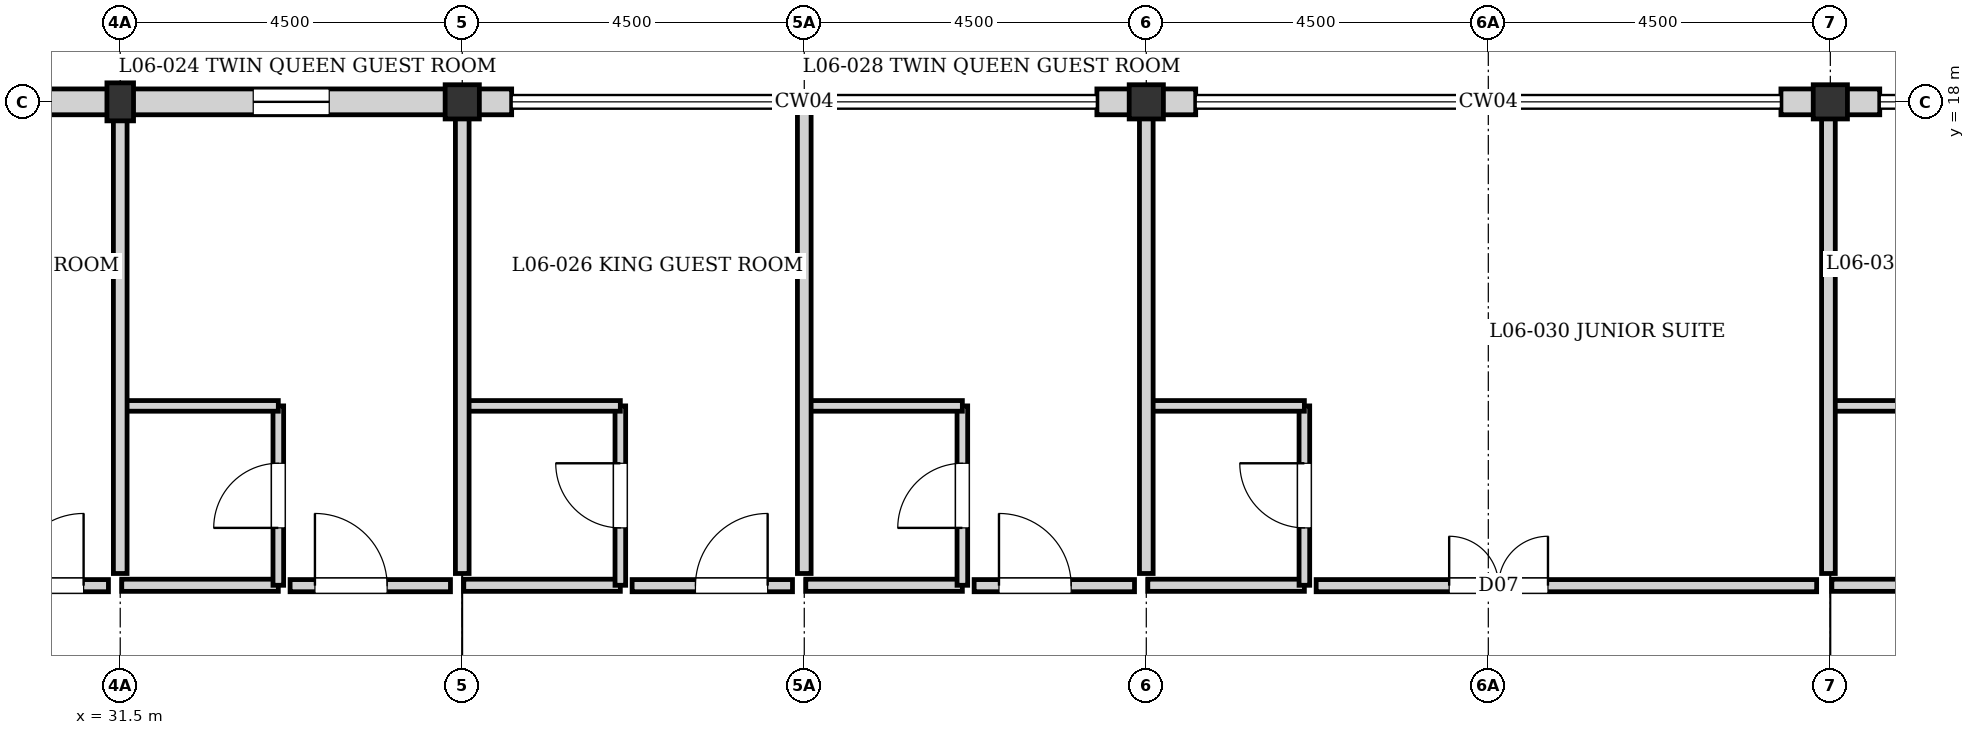
"""IFC4 building model, lengths in metres.
Left out: names, types, materials, properties, quantities, classifications, styles, units other than length and angle.
Written with IfcOpenShell. Run it as: python <this file> out.ifc"""

import sys

from ifc_helpers import new_model, si_unit, direction, frame, frame_2d, origin, origin_2d, place, context, subcontext, project, spatial, rectangle, extrude, element, fill, save


model = new_model("IFC4")
c1 = context("Model", 3, precision=1e-05, world=origin(), true_north=direction((0.0, 1.0)))
c2 = subcontext(c1, "Body", "Model", "MODEL_VIEW")
j1 = project(units=[si_unit("LENGTHUNIT", "METRE"), si_unit("PLANEANGLEUNIT", "RADIAN")], contexts=[c1])
p1 = place(None, origin())
s1 = spatial("IfcSite", under=j1, at=p1, CompositionType="ELEMENT")
p2 = place(p1, origin())
s2 = spatial("IfcBuilding", under=s1, at=p2, CompositionType="ELEMENT")
p3 = place(p2, frame((0.0, 0.0, 20.64)))
s3 = spatial("IfcBuildingStorey", under=s2, at=p3, CompositionType="ELEMENT", Elevation=20.64)
for number, where, z_axis, x_axis in (
    (1, (36.0, 18.0, 0.0), (0.0, 0.0, 1.0), (1.0, 0.0, 0.0)),
    (2, (45.0, 18.0, 0.0), (0.0, 0.0, 1.0), (1.0, 0.0, 0.0)),
    (3, (54.0, 18.0, 0.0), (0.0, 0.0, 1.0), (1.0, 0.0, 0.0)),
):
    element("IfcColumn", number, at=place(p3, frame(where, z_axis=z_axis, x_axis=x_axis)), inside=s3, PredefinedType="COLUMN", context=c2, shape_type="SweptSolid", body=[
        extrude(rectangle(XDim=0.45, YDim=0.45, at=origin_2d()), origin(), (0.0, 0.0, 1.0), 3.04),
    ])
p4 = place(p3, frame((31.5, 18.0, 0.0), z_axis=(0.0, 0.0, 1.0), x_axis=(1.0, 0.0, 0.0)))
e4 = element("IfcColumn", 4, at=p4, inside=s3, PredefinedType="PILASTER", context=c2, shape_type="SweptSolid", body=[
    extrude(rectangle(XDim=0.35, YDim=0.5, at=origin_2d()), origin(), (0.0, 0.0, 1.0), 3.04),
])
p5 = place(p3, frame((27.0, 18.0, 0.0), z_axis=(0.0, 0.0, 1.0), x_axis=(1.0, 0.0, 0.0)))
e5 = element("IfcWall", 5, at=p5, inside=s3, PredefinedType="SOLIDWALL", context=c2, shape_type="SweptSolid", body=[
    extrude(rectangle(XDim=9.0, YDim=0.34, at=frame_2d((4.5, 0.0))), origin(), (0.0, 0.0, 1.0), 2.38),
])
p6 = place(p5, frame((1.75, 0.0, 0.35)))
e6 = element("IfcOpeningElement", 6, at=p6, cuts=e5, PredefinedType="OPENING", context=c2, shape_type="SweptSolid", body=[
    extrude(rectangle(XDim=1.0, YDim=1.6, at=frame_2d((0.5, 0.8))), frame((0.0, 0.18, 0.0), z_axis=(0.0, -1.0, 0.0), x_axis=(1.0, 0.0, 0.0)), (0.0, 0.0, 1.0), 0.36),
])
p7 = place(p5, frame((6.25, 0.0, 0.35)))
e7 = element("IfcOpeningElement", 7, at=p7, cuts=e5, PredefinedType="OPENING", context=c2, shape_type="SweptSolid", body=[
    extrude(rectangle(XDim=1.0, YDim=1.6, at=frame_2d((0.5, 0.8))), frame((0.0, 0.18, 0.0), z_axis=(0.0, -1.0, 0.0), x_axis=(1.0, 0.0, 0.0)), (0.0, 0.0, 1.0), 0.36),
])
for number, where, z_axis, x_axis in (
    (8, (36.0, 18.0, 0.0), (0.0, 0.0, 1.0), (1.0, 0.0, 0.0)),
    (9, (44.35, 18.0, 0.0), (0.0, 0.0, 1.0), (1.0, 0.0, 0.0)),
):
    element("IfcWall", number, at=place(p3, frame(where, z_axis=z_axis, x_axis=x_axis)), inside=s3, PredefinedType="SOLIDWALL", context=c2, shape_type="SweptSolid", body=[
        extrude(rectangle(XDim=0.65, YDim=0.34, at=frame_2d((0.325, 0.0))), origin(), (0.0, 0.0, 1.0), 2.55),
    ])
for number, where, z_axis, x_axis in (
    (10, (45.0, 18.0, 0.0), (0.0, 0.0, 1.0), (1.0, 0.0, 0.0)),
    (11, (53.35, 18.0, 0.0), (0.0, 0.0, 1.0), (1.0, 0.0, 0.0)),
):
    element("IfcWall", number, at=place(p3, frame(where, z_axis=z_axis, x_axis=x_axis)), inside=s3, PredefinedType="SOLIDWALL", context=c2, shape_type="SweptSolid", body=[
        extrude(rectangle(XDim=0.65, YDim=0.34, at=frame_2d((0.325, 0.0))), origin(), (0.0, 0.0, 1.0), 2.48),
    ])
p8 = place(p3, frame((54.0, 18.0, 0.0), z_axis=(0.0, 0.0, 1.0), x_axis=(1.0, 0.0, 0.0)))
e12 = element("IfcWall", 12, at=p8, inside=s3, PredefinedType="SOLIDWALL", context=c2, shape_type="SweptSolid", body=[
    extrude(rectangle(XDim=0.65, YDim=0.34, at=frame_2d((0.325, 0.0))), origin(), (0.0, 0.0, 1.0), 2.42),
])
p9 = place(p3, frame((31.52, 11.64, 0.0), z_axis=(0.0, 0.0, 1.0), x_axis=(1.0, 0.0, 0.0)))
e13 = element("IfcWall", 13, at=p9, inside=s3, PredefinedType="PARTITIONING", context=c2, shape_type="SweptSolid", body=[
    extrude(rectangle(XDim=2.06, YDim=0.16, at=frame_2d((1.03, 0.0))), origin(), (0.0, 0.0, 1.0), 2.82),
])
p10 = place(p3, frame((33.58, 11.64, 0.0), z_axis=(0.0, 0.0, 1.0), x_axis=(0.0, 1.0, 0.0)))
e14 = element("IfcWall", 14, at=p10, inside=s3, PredefinedType="PLUMBINGWALL", context=c2, shape_type="SweptSolid", body=[
    extrude(rectangle(XDim=2.36, YDim=0.14, at=frame_2d((1.18, 0.0))), origin(), (0.0, 0.0, 1.0), 2.82),
])
p11 = place(p10, frame((0.755, 0.0, 0.0)))
e15 = element("IfcOpeningElement", 15, at=p11, cuts=e14, PredefinedType="OPENING", context=c2, shape_type="SweptSolid", body=[
    extrude(rectangle(XDim=0.85, YDim=2.04, at=frame_2d((0.425, 1.02))), frame((0.0, 0.08, 0.0), z_axis=(0.0, -1.0, 0.0), x_axis=(1.0, 0.0, 0.0)), (0.0, 0.0, 1.0), 0.16),
])
p12 = place(p3, frame((31.52, 14.0, 0.0), z_axis=(0.0, 0.0, 1.0), x_axis=(1.0, 0.0, 0.0)))
e16 = element("IfcWall", 16, at=p12, inside=s3, PredefinedType="PLUMBINGWALL", context=c2, shape_type="SweptSolid", body=[
    extrude(rectangle(XDim=2.06, YDim=0.14, at=frame_2d((1.03, 0.0))), origin(), (0.0, 0.0, 1.0), 2.82),
])
p13 = place(p3, frame((36.02, 11.64, 0.0), z_axis=(0.0, 0.0, 1.0), x_axis=(1.0, 0.0, 0.0)))
e17 = element("IfcWall", 17, at=p13, inside=s3, PredefinedType="PARTITIONING", context=c2, shape_type="SweptSolid", body=[
    extrude(rectangle(XDim=2.06, YDim=0.16, at=frame_2d((1.03, 0.0))), origin(), (0.0, 0.0, 1.0), 2.82),
])
p14 = place(p3, frame((38.08, 11.64, 0.0), z_axis=(0.0, 0.0, 1.0), x_axis=(0.0, 1.0, 0.0)))
e18 = element("IfcWall", 18, at=p14, inside=s3, PredefinedType="PLUMBINGWALL", context=c2, shape_type="SweptSolid", body=[
    extrude(rectangle(XDim=2.36, YDim=0.14, at=frame_2d((1.18, 0.0))), origin(), (0.0, 0.0, 1.0), 2.82),
])
p15 = place(p14, frame((0.755, 0.0, 0.0)))
e19 = element("IfcOpeningElement", 19, at=p15, cuts=e18, PredefinedType="OPENING", context=c2, shape_type="SweptSolid", body=[
    extrude(rectangle(XDim=0.85, YDim=2.04, at=frame_2d((0.425, 1.02))), frame((0.0, 0.08, 0.0), z_axis=(0.0, -1.0, 0.0), x_axis=(1.0, 0.0, 0.0)), (0.0, 0.0, 1.0), 0.16),
])
p16 = place(p3, frame((36.02, 14.0, 0.0), z_axis=(0.0, 0.0, 1.0), x_axis=(1.0, 0.0, 0.0)))
e20 = element("IfcWall", 20, at=p16, inside=s3, PredefinedType="PLUMBINGWALL", context=c2, shape_type="SweptSolid", body=[
    extrude(rectangle(XDim=2.06, YDim=0.14, at=frame_2d((1.03, 0.0))), origin(), (0.0, 0.0, 1.0), 2.82),
])
p17 = place(p3, frame((40.52, 11.64, 0.0), z_axis=(0.0, 0.0, 1.0), x_axis=(1.0, 0.0, 0.0)))
e21 = element("IfcWall", 21, at=p17, inside=s3, PredefinedType="PARTITIONING", context=c2, shape_type="SweptSolid", body=[
    extrude(rectangle(XDim=2.06, YDim=0.16, at=frame_2d((1.03, 0.0))), origin(), (0.0, 0.0, 1.0), 2.82),
])
p18 = place(p3, frame((42.58, 11.64, 0.0), z_axis=(0.0, 0.0, 1.0), x_axis=(0.0, 1.0, 0.0)))
e22 = element("IfcWall", 22, at=p18, inside=s3, PredefinedType="PLUMBINGWALL", context=c2, shape_type="SweptSolid", body=[
    extrude(rectangle(XDim=2.36, YDim=0.14, at=frame_2d((1.18, 0.0))), origin(), (0.0, 0.0, 1.0), 2.82),
])
p19 = place(p18, frame((0.755, 0.0, 0.0)))
e23 = element("IfcOpeningElement", 23, at=p19, cuts=e22, PredefinedType="OPENING", context=c2, shape_type="SweptSolid", body=[
    extrude(rectangle(XDim=0.85, YDim=2.04, at=frame_2d((0.425, 1.02))), frame((0.0, 0.08, 0.0), z_axis=(0.0, -1.0, 0.0), x_axis=(1.0, 0.0, 0.0)), (0.0, 0.0, 1.0), 0.16),
])
p20 = place(p3, frame((40.52, 14.0, 0.0), z_axis=(0.0, 0.0, 1.0), x_axis=(1.0, 0.0, 0.0)))
e24 = element("IfcWall", 24, at=p20, inside=s3, PredefinedType="PLUMBINGWALL", context=c2, shape_type="SweptSolid", body=[
    extrude(rectangle(XDim=2.06, YDim=0.14, at=frame_2d((1.03, 0.0))), origin(), (0.0, 0.0, 1.0), 2.82),
])
p21 = place(p3, frame((45.02, 11.64, 0.0), z_axis=(0.0, 0.0, 1.0), x_axis=(1.0, 0.0, 0.0)))
e25 = element("IfcWall", 25, at=p21, inside=s3, PredefinedType="PARTITIONING", context=c2, shape_type="SweptSolid", body=[
    extrude(rectangle(XDim=2.06, YDim=0.16, at=frame_2d((1.03, 0.0))), origin(), (0.0, 0.0, 1.0), 2.82),
])
p22 = place(p3, frame((47.08, 11.64, 0.0), z_axis=(0.0, 0.0, 1.0), x_axis=(0.0, 1.0, 0.0)))
e26 = element("IfcWall", 26, at=p22, inside=s3, PredefinedType="PLUMBINGWALL", context=c2, shape_type="SweptSolid", body=[
    extrude(rectangle(XDim=2.36, YDim=0.14, at=frame_2d((1.18, 0.0))), origin(), (0.0, 0.0, 1.0), 2.82),
])
p23 = place(p22, frame((0.755, 0.0, 0.0)))
e27 = element("IfcOpeningElement", 27, at=p23, cuts=e26, PredefinedType="OPENING", context=c2, shape_type="SweptSolid", body=[
    extrude(rectangle(XDim=0.85, YDim=2.04, at=frame_2d((0.425, 1.02))), frame((0.0, 0.08, 0.0), z_axis=(0.0, -1.0, 0.0), x_axis=(1.0, 0.0, 0.0)), (0.0, 0.0, 1.0), 0.16),
])
p24 = place(p3, frame((45.02, 14.0, 0.0), z_axis=(0.0, 0.0, 1.0), x_axis=(1.0, 0.0, 0.0)))
e28 = element("IfcWall", 28, at=p24, inside=s3, PredefinedType="PLUMBINGWALL", context=c2, shape_type="SweptSolid", body=[
    extrude(rectangle(XDim=2.06, YDim=0.14, at=frame_2d((1.03, 0.0))), origin(), (0.0, 0.0, 1.0), 2.82),
])
p25 = place(p3, frame((54.02, 11.64, 0.0), z_axis=(0.0, 0.0, 1.0), x_axis=(1.0, 0.0, 0.0)))
e29 = element("IfcWall", 29, at=p25, inside=s3, PredefinedType="PARTITIONING", context=c2, shape_type="SweptSolid", body=[
    extrude(rectangle(XDim=2.06, YDim=0.16, at=frame_2d((1.03, 0.0))), origin(), (0.0, 0.0, 1.0), 2.82),
])
p26 = place(p3, frame((54.02, 14.0, 0.0), z_axis=(0.0, 0.0, 1.0), x_axis=(1.0, 0.0, 0.0)))
e30 = element("IfcWall", 30, at=p26, inside=s3, PredefinedType="PLUMBINGWALL", context=c2, shape_type="SweptSolid", body=[
    extrude(rectangle(XDim=2.06, YDim=0.14, at=frame_2d((1.03, 0.0))), origin(), (0.0, 0.0, 1.0), 2.82),
])
p27 = place(p3, frame((31.5, 11.795, 0.0), z_axis=(0.0, 0.0, 1.0), x_axis=(0.0, 1.0, 0.0)))
e31 = element("IfcWall", 31, at=p27, inside=s3, PredefinedType="PARTITIONING", context=c2, shape_type="SweptSolid", body=[
    extrude(rectangle(XDim=6.03, YDim=0.18, at=frame_2d((3.015, 0.0))), origin(), (0.0, 0.0, 1.0), 2.82),
])
p28 = place(p3, frame((36.0, 11.795, 0.0), z_axis=(0.0, 0.0, 1.0), x_axis=(0.0, 1.0, 0.0)))
e32 = element("IfcWall", 32, at=p28, inside=s3, PredefinedType="PARTITIONING", context=c2, shape_type="SweptSolid", body=[
    extrude(rectangle(XDim=6.03, YDim=0.18, at=frame_2d((3.015, 0.0))), origin(), (0.0, 0.0, 1.0), 2.09),
])
p29 = place(p3, frame((40.5, 11.795, 0.0), z_axis=(0.0, 0.0, 1.0), x_axis=(0.0, 1.0, 0.0)))
e33 = element("IfcWall", 33, at=p29, inside=s3, PredefinedType="PARTITIONING", context=c2, shape_type="SweptSolid", body=[
    extrude(rectangle(XDim=6.11, YDim=0.18, at=frame_2d((3.055, 0.0))), origin(), (0.0, 0.0, 1.0), 2.82),
])
p30 = place(p3, frame((45.0, 11.795, 0.0), z_axis=(0.0, 0.0, 1.0), x_axis=(0.0, 1.0, 0.0)))
e34 = element("IfcWall", 34, at=p30, inside=s3, PredefinedType="PARTITIONING", context=c2, shape_type="SweptSolid", body=[
    extrude(rectangle(XDim=6.03, YDim=0.18, at=frame_2d((3.015, 0.0))), origin(), (0.0, 0.0, 1.0), 2.49),
])
p31 = place(p3, frame((53.975, 11.795, 0.0), z_axis=(0.0, 0.0, 1.0), x_axis=(0.0, 1.0, 0.0)))
e35 = element("IfcWall", 35, at=p31, inside=s3, PredefinedType="PARTITIONING", context=c2, shape_type="SweptSolid", body=[
    extrude(rectangle(XDim=6.03, YDim=0.18, at=frame_2d((3.015, 0.0))), origin(), (0.0, 0.0, 1.0), 2.42),
])
p32 = place(p3, frame((29.235, 11.635, 0.0), z_axis=(0.0, 0.0, 1.0), x_axis=(1.0, 0.0, 0.0)))
e36 = element("IfcWall", 36, at=p32, inside=s3, PredefinedType="PARTITIONING", context=c2, shape_type="SweptSolid", body=[
    extrude(rectangle(XDim=2.11, YDim=0.16, at=frame_2d((1.055, 0.0))), origin(), (0.0, 0.0, 1.0), 2.82),
])
p33 = place(p32, frame((0.833, 0.0, 0.0)))
e37 = element("IfcOpeningElement", 37, at=p33, cuts=e36, PredefinedType="OPENING", context=c2, shape_type="SweptSolid", body=[
    extrude(rectangle(XDim=0.95, YDim=2.15, at=frame_2d((0.475, 1.075))), frame((0.0, 0.09, 0.0), z_axis=(0.0, -1.0, 0.0), x_axis=(1.0, 0.0, 0.0)), (0.0, 0.0, 1.0), 0.18),
])
p34 = place(p3, frame((33.735, 11.635, 0.0), z_axis=(0.0, 0.0, 1.0), x_axis=(1.0, 0.0, 0.0)))
e38 = element("IfcWall", 38, at=p34, inside=s3, PredefinedType="PARTITIONING", context=c2, shape_type="SweptSolid", body=[
    extrude(rectangle(XDim=2.11, YDim=0.16, at=frame_2d((1.055, 0.0))), origin(), (0.0, 0.0, 1.0), 2.82),
])
p35 = place(p34, frame((0.327, 0.0, 0.0)))
e39 = element("IfcOpeningElement", 39, at=p35, cuts=e38, PredefinedType="OPENING", context=c2, shape_type="SweptSolid", body=[
    extrude(rectangle(XDim=0.95, YDim=2.15, at=frame_2d((0.475, 1.075))), frame((0.0, 0.09, 0.0), z_axis=(0.0, -1.0, 0.0), x_axis=(1.0, 0.0, 0.0)), (0.0, 0.0, 1.0), 0.18),
])
p36 = place(p3, frame((38.235, 11.635, 0.0), z_axis=(0.0, 0.0, 1.0), x_axis=(1.0, 0.0, 0.0)))
e40 = element("IfcWall", 40, at=p36, inside=s3, PredefinedType="PARTITIONING", context=c2, shape_type="SweptSolid", body=[
    extrude(rectangle(XDim=2.11, YDim=0.16, at=frame_2d((1.055, 0.0))), origin(), (0.0, 0.0, 1.0), 2.82),
])
p37 = place(p36, frame((0.833, 0.0, 0.0)))
e41 = element("IfcOpeningElement", 41, at=p37, cuts=e40, PredefinedType="OPENING", context=c2, shape_type="SweptSolid", body=[
    extrude(rectangle(XDim=0.95, YDim=2.15, at=frame_2d((0.475, 1.075))), frame((0.0, 0.09, 0.0), z_axis=(0.0, -1.0, 0.0), x_axis=(1.0, 0.0, 0.0)), (0.0, 0.0, 1.0), 0.18),
])
p38 = place(p3, frame((42.735, 11.635, 0.0), z_axis=(0.0, 0.0, 1.0), x_axis=(1.0, 0.0, 0.0)))
e42 = element("IfcWall", 42, at=p38, inside=s3, PredefinedType="PARTITIONING", context=c2, shape_type="SweptSolid", body=[
    extrude(rectangle(XDim=2.11, YDim=0.16, at=frame_2d((1.055, 0.0))), origin(), (0.0, 0.0, 1.0), 2.82),
])
p39 = place(p38, frame((0.327, 0.0, 0.0)))
e43 = element("IfcOpeningElement", 43, at=p39, cuts=e42, PredefinedType="OPENING", context=c2, shape_type="SweptSolid", body=[
    extrude(rectangle(XDim=0.95, YDim=2.15, at=frame_2d((0.475, 1.075))), frame((0.0, 0.09, 0.0), z_axis=(0.0, -1.0, 0.0), x_axis=(1.0, 0.0, 0.0)), (0.0, 0.0, 1.0), 0.18),
])
p40 = place(p3, frame((47.235, 11.635, 0.0), z_axis=(0.0, 0.0, 1.0), x_axis=(1.0, 0.0, 0.0)))
e44 = element("IfcWall", 44, at=p40, inside=s3, PredefinedType="PARTITIONING", context=c2, shape_type="SweptSolid", body=[
    extrude(rectangle(XDim=6.585, YDim=0.16, at=frame_2d((3.292, 0.0))), origin(), (0.0, 0.0, 1.0), 2.82),
])
p41 = place(p40, frame((1.75, 0.0, 0.0)))
e45 = element("IfcOpeningElement", 45, at=p41, cuts=e44, PredefinedType="OPENING", context=c2, shape_type="SweptSolid", body=[
    extrude(rectangle(XDim=1.3, YDim=2.25, at=frame_2d((0.65, 1.125))), frame((0.0, 0.09, 0.0), z_axis=(0.0, -1.0, 0.0), x_axis=(1.0, 0.0, 0.0)), (0.0, 0.0, 1.0), 0.18),
])
p42 = place(p7, origin())
e46 = element("IfcWindow", 46, at=p42, inside=s3, PartitioningType="SINGLE_PANEL", PredefinedType="WINDOW", context=c2, shape_type="SweptSolid", body=[
    extrude(rectangle(XDim=1.0, YDim=1.6, at=frame_2d((0.5, 0.8))), frame((0.0, 0.03, 0.0), z_axis=(0.0, -1.0, 0.0), x_axis=(1.0, 0.0, 0.0)), (0.0, 0.0, 1.0), 0.06),
])
fill(e7, e46)
p43 = place(p11, origin())
e47 = element("IfcDoor", 47, at=p43, inside=s3, OperationType="SINGLE_SWING_LEFT", PredefinedType="DOOR", context=c2, shape_type="SweptSolid", body=[
    extrude(rectangle(XDim=0.85, YDim=2.04, at=frame_2d((0.425, 1.02))), frame((0.0, 0.025, 0.0), z_axis=(0.0, -1.0, 0.0), x_axis=(1.0, 0.0, 0.0)), (0.0, 0.0, 1.0), 0.05),
])
fill(e15, e47)
p44 = place(p15, origin())
e48 = element("IfcDoor", 48, at=p44, inside=s3, OperationType="SINGLE_SWING_RIGHT", PredefinedType="DOOR", context=c2, shape_type="SweptSolid", body=[
    extrude(rectangle(XDim=0.85, YDim=2.04, at=frame_2d((0.425, 1.02))), frame((0.0, 0.025, 0.0), z_axis=(0.0, -1.0, 0.0), x_axis=(1.0, 0.0, 0.0)), (0.0, 0.0, 1.0), 0.05),
])
fill(e19, e48)
p45 = place(p19, origin())
e49 = element("IfcDoor", 49, at=p45, inside=s3, OperationType="SINGLE_SWING_LEFT", PredefinedType="DOOR", context=c2, shape_type="SweptSolid", body=[
    extrude(rectangle(XDim=0.85, YDim=2.04, at=frame_2d((0.425, 1.02))), frame((0.0, 0.025, 0.0), z_axis=(0.0, -1.0, 0.0), x_axis=(1.0, 0.0, 0.0)), (0.0, 0.0, 1.0), 0.05),
])
fill(e23, e49)
p46 = place(p23, origin())
e50 = element("IfcDoor", 50, at=p46, inside=s3, OperationType="SINGLE_SWING_RIGHT", PredefinedType="DOOR", context=c2, shape_type="SweptSolid", body=[
    extrude(rectangle(XDim=0.85, YDim=2.04, at=frame_2d((0.425, 1.02))), frame((0.0, 0.025, 0.0), z_axis=(0.0, -1.0, 0.0), x_axis=(1.0, 0.0, 0.0)), (0.0, 0.0, 1.0), 0.05),
])
fill(e27, e50)
p47 = place(p33, origin())
e51 = element("IfcDoor", 51, at=p47, inside=s3, OperationType="SINGLE_SWING_RIGHT", PredefinedType="DOOR", context=c2, shape_type="SweptSolid", body=[
    extrude(rectangle(XDim=0.95, YDim=2.15, at=frame_2d((0.475, 1.075))), frame((0.0, 0.025, 0.0), z_axis=(0.0, -1.0, 0.0), x_axis=(1.0, 0.0, 0.0)), (0.0, 0.0, 1.0), 0.05),
])
fill(e37, e51)
p48 = place(p35, origin())
e52 = element("IfcDoor", 52, at=p48, inside=s3, OperationType="SINGLE_SWING_LEFT", PredefinedType="DOOR", context=c2, shape_type="SweptSolid", body=[
    extrude(rectangle(XDim=0.95, YDim=2.15, at=frame_2d((0.475, 1.075))), frame((0.0, 0.025, 0.0), z_axis=(0.0, -1.0, 0.0), x_axis=(1.0, 0.0, 0.0)), (0.0, 0.0, 1.0), 0.05),
])
fill(e39, e52)
p49 = place(p37, origin())
e53 = element("IfcDoor", 53, at=p49, inside=s3, OperationType="SINGLE_SWING_RIGHT", PredefinedType="DOOR", context=c2, shape_type="SweptSolid", body=[
    extrude(rectangle(XDim=0.95, YDim=2.15, at=frame_2d((0.475, 1.075))), frame((0.0, 0.025, 0.0), z_axis=(0.0, -1.0, 0.0), x_axis=(1.0, 0.0, 0.0)), (0.0, 0.0, 1.0), 0.05),
])
fill(e41, e53)
p50 = place(p39, origin())
e54 = element("IfcDoor", 54, at=p50, inside=s3, OperationType="SINGLE_SWING_LEFT", PredefinedType="DOOR", context=c2, shape_type="SweptSolid", body=[
    extrude(rectangle(XDim=0.95, YDim=2.15, at=frame_2d((0.475, 1.075))), frame((0.0, 0.025, 0.0), z_axis=(0.0, -1.0, 0.0), x_axis=(1.0, 0.0, 0.0)), (0.0, 0.0, 1.0), 0.05),
])
fill(e43, e54)
p51 = place(p41, origin())
e55 = element("IfcDoor", 55, at=p51, inside=s3, OperationType="DOUBLE_DOOR_SINGLE_SWING", PredefinedType="DOOR", context=c2, shape_type="SweptSolid", body=[
    extrude(rectangle(XDim=1.3, YDim=2.25, at=frame_2d((0.65, 1.125))), frame((0.0, 0.025, 0.0), z_axis=(0.0, -1.0, 0.0), x_axis=(1.0, 0.0, 0.0)), (0.0, 0.0, 1.0), 0.05),
])
fill(e45, e55)
save(model, sys.argv[1])
